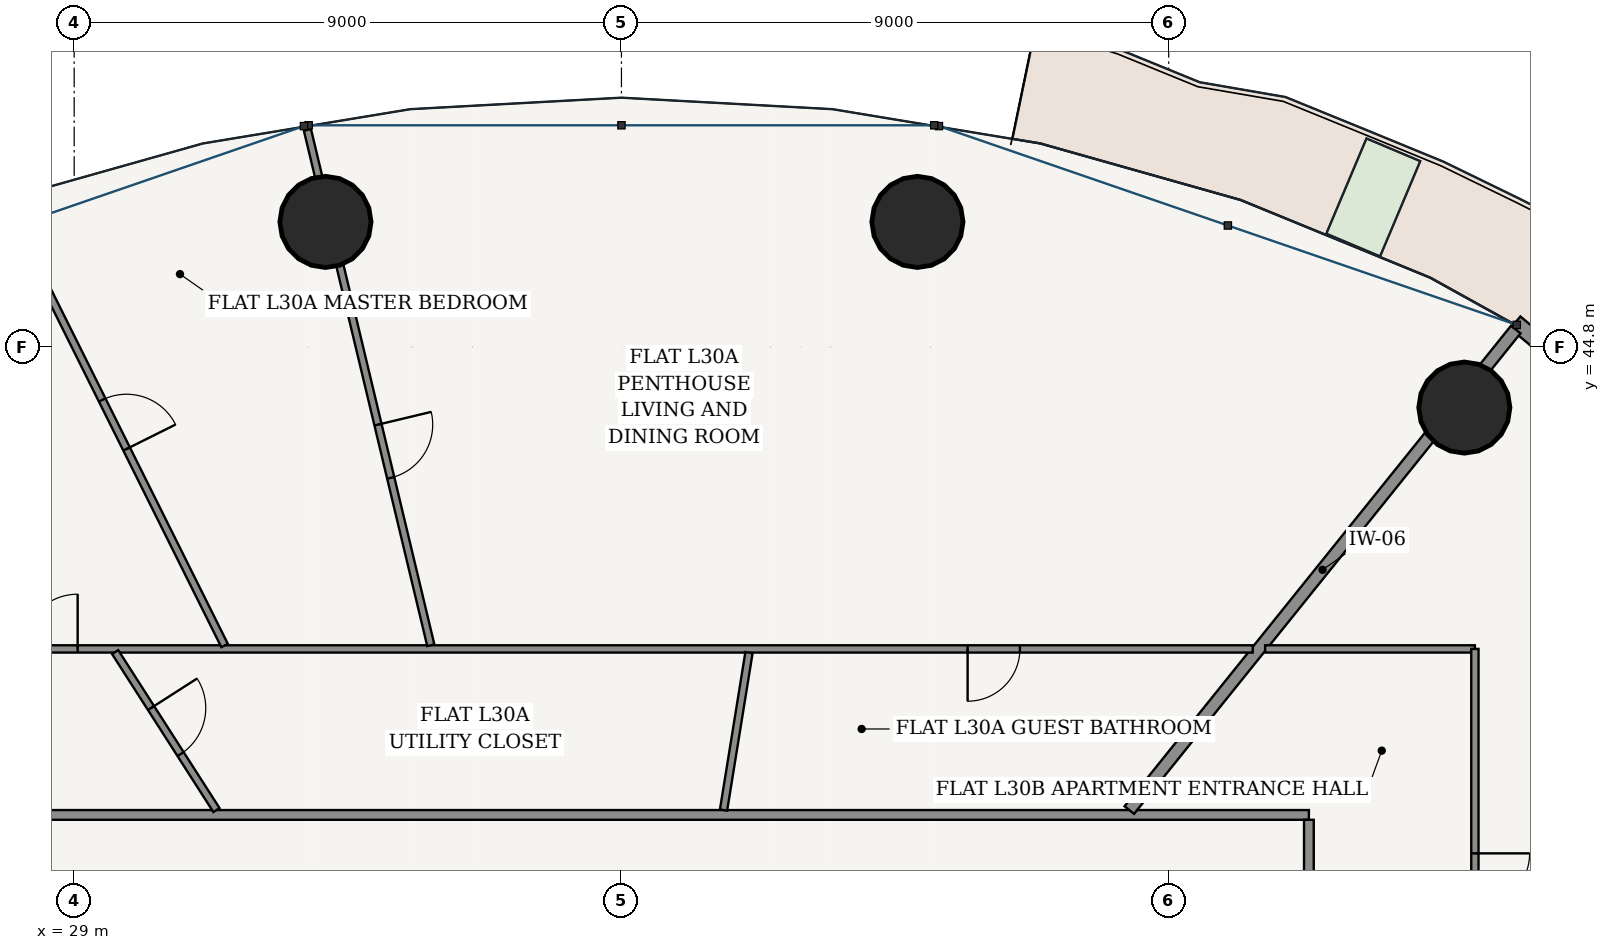
"""IFC4 building model, lengths in metres.
Left out: names, types, materials, properties, quantities, classifications, styles, units other than length and angle.
Written with IfcOpenShell. Run it as: python <this file> out.ifc"""

import sys

from ifc_helpers import new_model, si_unit, direction, frame, frame_2d, origin, origin_2d, place, context, subcontext, project, spatial, rectangle, hollow_circle, extrude, source, transform, mapped, element, fill, save


model = new_model("IFC4")
c1 = context("Model", 3, precision=1e-05, world=origin(), true_north=direction((-0.2419218956, 0.970295726276)))
c2 = subcontext(c1, "Body", "Model", "MODEL_VIEW")
j1 = project(units=[si_unit("LENGTHUNIT", "METRE"), si_unit("PLANEANGLEUNIT", "RADIAN")], contexts=[c1])
p1 = place(None, origin())
s1 = spatial("IfcSite", under=j1, at=p1, CompositionType="ELEMENT")
p2 = place(p1, origin())
s2 = spatial("IfcBuilding", under=s1, at=p2, CompositionType="ELEMENT")
p3 = place(p2, frame((0.0, 0.0, 115.8)))
s3 = spatial("IfcBuildingStorey", under=s2, at=p3, CompositionType="ELEMENT", Elevation=115.8)
for number, where, z_axis, x_axis in (
    (1, (51.862, 43.803, 0.0), (0.0, 0.0, 1.0), (1.0, 0.0, 0.0)),
    (2, (42.867, 46.857, 0.0), (0.0, 0.0, 1.0), (1.0, 0.0, 0.0)),
    (3, (33.133, 46.857, 0.0), (0.0, 0.0, 1.0), (1.0, 0.0, 0.0)),
):
    element("IfcColumn", number, at=place(p3, frame(where, z_axis=z_axis, x_axis=x_axis)), inside=s3, PredefinedType="COLUMN", context=c2, shape_type="SweptSolid", body=[
        extrude(hollow_circle(Radius=0.75, WallThickness=0.045, at=origin_2d()), origin(), (0.0, 0.0, 1.0), 3.6),
    ])
p4 = place(p3, frame((60.154, 39.01, 0.0), z_axis=(0.0, 0.0, 1.0), x_axis=(-0.769242574941, 0.638956853706, 0.0)))
e4 = element("IfcWall", 4, at=p4, inside=s3, PredefinedType="SOLIDWALL", context=c2, shape_type="SweptSolid", body=[
    extrude(rectangle(XDim=9.69, YDim=0.26, at=frame_2d((4.845, 0.0))), origin(), (0.0, 0.0, 1.0), 3.325),
])
p5 = place(p4, frame((4.17, 0.0, 0.0)))
e5 = element("IfcOpeningElement", 5, at=p5, cuts=e4, PredefinedType="OPENING", context=c2, shape_type="SweptSolid", body=[
    extrude(rectangle(XDim=1.35, YDim=2.2, at=frame_2d((0.675, 1.1))), frame((0.0, 0.14, 0.0), z_axis=(0.0, -1.0, 0.0), x_axis=(1.0, 0.0, 0.0)), (0.0, 0.0, 1.0), 0.28),
])
p6 = place(p3, frame((26.695, 37.105, 0.0), z_axis=(0.0, 0.0, 1.0), x_axis=(1.0, 0.0, 0.0)))
e6 = element("IfcWall", 6, at=p6, inside=s3, PredefinedType="PARTITIONING", context=c2, shape_type="SweptSolid", body=[
    extrude(rectangle(XDim=22.61, YDim=0.16, at=frame_2d((11.305, 0.0))), origin(), (0.0, 0.0, 1.0), 2.767),
])
p7 = place(p3, frame((49.305, 16.575, 0.0), z_axis=(0.0, 0.0, 1.0), x_axis=(0.0, 1.0, 0.0)))
e7 = element("IfcWall", 7, at=p7, inside=s3, PredefinedType="PARTITIONING", context=c2, shape_type="SweptSolid", body=[
    extrude(rectangle(XDim=20.45, YDim=0.16, at=frame_2d((10.225, 0.0))), origin(), (0.0, 0.0, 1.0), 2.767),
])
p8 = place(p7, frame((17.046, 0.0, 0.0)))
e8 = element("IfcOpeningElement", 8, at=p8, cuts=e7, PredefinedType="OPENING", context=c2, shape_type="SweptSolid", body=[
    extrude(rectangle(XDim=0.98, YDim=2.2, at=frame_2d((0.49, 1.1))), frame((0.0, 0.09, 0.0), z_axis=(0.0, -1.0, 0.0), x_axis=(1.0, 0.0, 0.0)), (0.0, 0.0, 1.0), 0.18),
])
p9 = place(p3, frame((46.352, 37.185, 0.0), z_axis=(0.0, 0.0, 1.0), x_axis=(0.626712884514, 0.779250255299, 0.0)))
e9 = element("IfcWall", 9, at=p9, inside=s3, PredefinedType="PARTITIONING", context=c2, shape_type="SweptSolid", body=[
    extrude(rectangle(XDim=10.141, YDim=0.2, at=frame_2d((5.07, 0.0))), origin(), (0.0, 0.0, 1.0), 2.767),
])
p10 = place(p3, frame((23.965, 39.835, 0.0), z_axis=(0.0, 0.0, 1.0), x_axis=(1.0, 0.0, 0.0)))
e10 = element("IfcWall", 10, at=p10, inside=s3, PredefinedType="PARTITIONING", context=c2, shape_type="SweptSolid", body=[
    extrude(rectangle(XDim=24.416, YDim=0.12, at=frame_2d((12.208, 0.0))), origin(), (0.0, 0.0, 1.0), 2.767),
])
p11 = place(p10, frame((4.192, 0.0, 0.0)))
e11 = element("IfcOpeningElement", 11, at=p11, cuts=e10, PredefinedType="OPENING", context=c2, shape_type="SweptSolid", body=[
    extrude(rectangle(XDim=0.9, YDim=2.15, at=frame_2d((0.45, 1.075))), frame((0.0, 0.07, 0.0), z_axis=(0.0, -1.0, 0.0), x_axis=(1.0, 0.0, 0.0)), (0.0, 0.0, 1.0), 0.14),
])
p12 = place(p10, frame((19.728, 0.0, 0.0)))
e12 = element("IfcOpeningElement", 12, at=p12, cuts=e10, PredefinedType="OPENING", context=c2, shape_type="SweptSolid", body=[
    extrude(rectangle(XDim=0.86, YDim=2.15, at=frame_2d((0.43, 1.075))), frame((0.0, 0.07, 0.0), z_axis=(0.0, -1.0, 0.0), x_axis=(1.0, 0.0, 0.0)), (0.0, 0.0, 1.0), 0.14),
])
p13 = place(p3, frame((34.865, 39.895, 0.0), z_axis=(0.0, 0.0, 1.0), x_axis=(-0.23282725047, 0.97251810854, 0.0)))
e13 = element("IfcWall", 13, at=p13, inside=s3, PredefinedType="PARTITIONING", context=c2, shape_type="SweptSolid", body=[
    extrude(rectangle(XDim=8.715, YDim=0.12, at=frame_2d((4.357, 0.0))), origin(), (0.0, 0.0, 1.0), 2.767),
])
p14 = place(p13, frame((2.831, 0.0, 0.0)))
e14 = element("IfcOpeningElement", 14, at=p14, cuts=e13, PredefinedType="OPENING", context=c2, shape_type="SweptSolid", body=[
    extrude(rectangle(XDim=0.9, YDim=2.15, at=frame_2d((0.45, 1.075))), frame((0.0, 0.07, 0.0), z_axis=(0.0, -1.0, 0.0), x_axis=(1.0, 0.0, 0.0)), (0.0, 0.0, 1.0), 0.14),
])
p15 = place(p3, frame((31.474, 39.89, 0.0), z_axis=(0.0, 0.0, 1.0), x_axis=(-0.446167584581, 0.894949432353, 0.0)))
e15 = element("IfcWall", 15, at=p15, inside=s3, PredefinedType="PARTITIONING", context=c2, shape_type="SweptSolid", body=[
    extrude(rectangle(XDim=8.125, YDim=0.12, at=frame_2d((4.062, 0.0))), origin(), (0.0, 0.0, 1.0), 2.767),
])
p16 = place(p15, frame((3.612, 0.0, 0.0)))
e16 = element("IfcOpeningElement", 16, at=p16, cuts=e15, PredefinedType="OPENING", context=c2, shape_type="SweptSolid", body=[
    extrude(rectangle(XDim=0.9, YDim=2.15, at=frame_2d((0.45, 1.075))), frame((0.0, 0.07, 0.0), z_axis=(0.0, -1.0, 0.0), x_axis=(1.0, 0.0, 0.0)), (0.0, 0.0, 1.0), 0.14),
])
p17 = place(p3, frame((39.679, 37.185, 0.0), z_axis=(0.0, 0.0, 1.0), x_axis=(0.159580767408, 0.98718487563, 0.0)))
e17 = element("IfcWall", 17, at=p17, inside=s3, PredefinedType="PARTITIONING", context=c2, shape_type="SweptSolid", body=[
    extrude(rectangle(XDim=2.622, YDim=0.12, at=frame_2d((1.311, 0.0))), origin(), (0.0, 0.0, 1.0), 3.325),
])
p18 = place(p3, frame((31.34, 37.185, 0.0), z_axis=(0.0, 0.0, 1.0), x_axis=(-0.539861631895, 0.841753775405, 0.0)))
e18 = element("IfcWall", 18, at=p18, inside=s3, PredefinedType="PARTITIONING", context=c2, shape_type="SweptSolid", body=[
    extrude(rectangle(XDim=3.086, YDim=0.12, at=frame_2d((1.543, 0.0))), origin(), (0.0, 0.0, 1.0), 3.325),
])
p19 = place(p18, frame((1.093, 0.0, 0.0)))
e19 = element("IfcOpeningElement", 19, at=p19, cuts=e18, PredefinedType="OPENING", context=c2, shape_type="SweptSolid", body=[
    extrude(rectangle(XDim=0.9, YDim=2.15, at=frame_2d((0.45, 1.075))), frame((0.0, 0.07, 0.0), z_axis=(0.0, -1.0, 0.0), x_axis=(1.0, 0.0, 0.0)), (0.0, 0.0, 1.0), 0.14),
])
p20 = place(p3, frame((48.585, 39.835, 0.0), z_axis=(0.0, 0.0, 1.0), x_axis=(1.0, 0.0, 0.0)))
e20 = element("IfcWall", 20, at=p20, inside=s3, PredefinedType="PARTITIONING", context=c2, shape_type="SweptSolid", body=[
    extrude(rectangle(XDim=3.45, YDim=0.12, at=frame_2d((1.725, 0.0))), origin(), (0.0, 0.0, 1.0), 2.767),
])
p21 = place(p3, frame((52.035, 39.835, 0.0), z_axis=(0.0, 0.0, 1.0), x_axis=(0.0, -1.0, 0.0)))
e21 = element("IfcWall", 21, at=p21, inside=s3, PredefinedType="PARTITIONING", context=c2, shape_type="SweptSolid", body=[
    extrude(rectangle(XDim=26.07, YDim=0.12, at=frame_2d((13.035, 0.0))), origin(), (0.0, 0.0, 1.0), 2.767),
])
p22 = place(p21, frame((3.362, 0.0, 0.0)))
e22 = element("IfcOpeningElement", 22, at=p22, cuts=e21, PredefinedType="OPENING", context=c2, shape_type="SweptSolid", body=[
    extrude(rectangle(XDim=0.9, YDim=2.15, at=frame_2d((0.45, 1.075))), frame((0.0, 0.07, 0.0), z_axis=(0.0, -1.0, 0.0), x_axis=(1.0, 0.0, 0.0)), (0.0, 0.0, 1.0), 0.14),
])
p23 = place(p21, frame((13.924, 0.0, 0.0)))
e23 = element("IfcOpeningElement", 23, at=p23, cuts=e21, PredefinedType="OPENING", context=c2, shape_type="SweptSolid", body=[
    extrude(rectangle(XDim=0.9, YDim=2.15, at=frame_2d((0.45, 1.075))), frame((0.0, 0.07, 0.0), z_axis=(0.0, -1.0, 0.0), x_axis=(1.0, 0.0, 0.0)), (0.0, 0.0, 1.0), 0.14),
])
m1 = source(origin(), c2, "Body", "SweptSolid", [
    extrude(rectangle(XDim=0.9, YDim=2.15, at=frame_2d((0.45, 1.075))), frame((0.0, 0.025, 0.0), z_axis=(0.0, -1.0, 0.0), x_axis=(1.0, 0.0, 0.0)), (0.0, 0.0, 1.0), 0.05),
])
p24 = place(p11, origin())
e24 = element("IfcDoor", 24, at=p24, inside=s3, OperationType="SINGLE_SWING_RIGHT", PredefinedType="DOOR", context=c2, shape_type="MappedRepresentation", body=[
    mapped(m1, transform((0.0, 0.0, 0.0), scale=1.0)),
])
fill(e11, e24)
p25 = place(p19, frame((0.9, 0.0, 0.0), z_axis=(0.0, 0.0, 1.0), x_axis=(-1.0, 0.0, 0.0)))
e25 = element("IfcDoor", 25, at=p25, inside=s3, OperationType="SINGLE_SWING_LEFT", PredefinedType="DOOR", context=c2, shape_type="MappedRepresentation", body=[
    mapped(m1, transform((0.0, 0.0, 0.0), scale=1.0)),
])
fill(e19, e25)
p26 = place(p16, frame((0.9, 0.0, 0.0), z_axis=(0.0, 0.0, 1.0), x_axis=(-1.0, 0.0, 0.0)))
e26 = element("IfcDoor", 26, at=p26, inside=s3, OperationType="SINGLE_SWING_RIGHT", PredefinedType="DOOR", context=c2, shape_type="MappedRepresentation", body=[
    mapped(m1, transform((0.0, 0.0, 0.0), scale=1.0)),
])
fill(e16, e26)
p27 = place(p14, frame((0.9, 0.0, 0.0), z_axis=(0.0, 0.0, 1.0), x_axis=(-1.0, 0.0, 0.0)))
e27 = element("IfcDoor", 27, at=p27, inside=s3, OperationType="SINGLE_SWING_LEFT", PredefinedType="DOOR", context=c2, shape_type="MappedRepresentation", body=[
    mapped(m1, transform((0.0, 0.0, 0.0), scale=1.0)),
])
fill(e14, e27)
m2 = source(origin(), c2, "Body", "SweptSolid", [
    extrude(rectangle(XDim=0.86, YDim=2.15, at=frame_2d((0.43, 1.075))), frame((0.0, 0.025, 0.0), z_axis=(0.0, -1.0, 0.0), x_axis=(1.0, 0.0, 0.0)), (0.0, 0.0, 1.0), 0.05),
])
p28 = place(p12, frame((0.86, 0.0, 0.0), z_axis=(0.0, 0.0, 1.0), x_axis=(-1.0, 0.0, 0.0)))
e28 = element("IfcDoor", 28, at=p28, inside=s3, OperationType="SINGLE_SWING_RIGHT", PredefinedType="DOOR", context=c2, shape_type="MappedRepresentation", body=[
    mapped(m2, transform((0.0, 0.0, 0.0), scale=1.0)),
])
fill(e12, e28)
p29 = place(p22, origin())
e29 = element("IfcDoor", 29, at=p29, inside=s3, OperationType="SINGLE_SWING_LEFT", PredefinedType="DOOR", context=c2, shape_type="MappedRepresentation", body=[
    mapped(m1, transform((0.0, 0.0, 0.0), scale=1.0)),
])
fill(e22, e29)
save(model, sys.argv[1])
